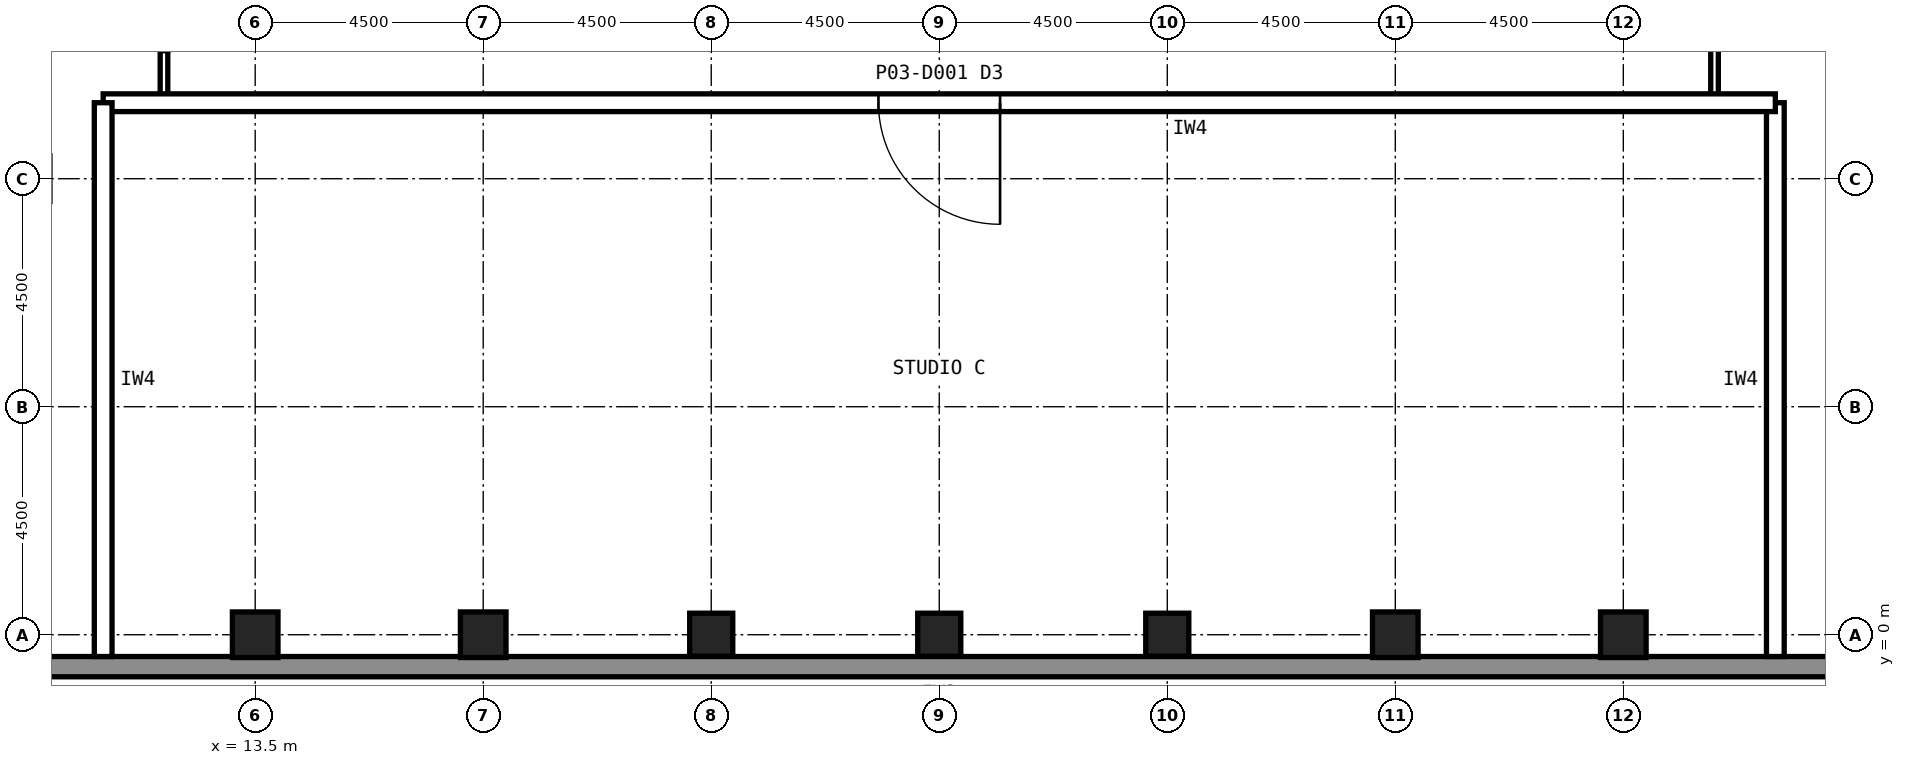
"""IFC4 building model, lengths in metres.
Left out: names, types, materials, properties, quantities, classifications, styles, units other than length and angle.
Written with IfcOpenShell. Run it as: python <this file> out.ifc"""

import sys

from ifc_helpers import new_model, si_unit, direction, frame, frame_2d, origin, origin_2d, place, context, subcontext, project, spatial, rectangle, hollow_rectangle, extrude, element, fill, save


model = new_model("IFC4")
c1 = context("Model", 3, precision=1e-05, world=origin(), true_north=direction((0.0, 1.0)))
c2 = subcontext(c1, "Body", "Model", "MODEL_VIEW")
j1 = project(units=[si_unit("LENGTHUNIT", "METRE"), si_unit("PLANEANGLEUNIT", "RADIAN")], contexts=[c1])
p1 = place(None, origin())
s1 = spatial("IfcSite", under=j1, at=p1, CompositionType="ELEMENT")
p2 = place(p1, origin())
s2 = spatial("IfcBuilding", under=s1, at=p2, CompositionType="ELEMENT")
p3 = place(p2, frame((0.0, 0.0, 12.0)))
s3 = spatial("IfcBuildingStorey", under=s2, at=p3, CompositionType="ELEMENT", Elevation=12.0)
for number, where, z_axis, x_axis in (
    (1, (13.5, 0.0, 0.0), (0.0, 0.0, 1.0), (1.0, 0.0, 0.0)),
    (2, (18.0, 0.0, 0.0), (0.0, 0.0, 1.0), (1.0, 0.0, 0.0)),
):
    element("IfcColumn", number, at=place(p3, frame(where, z_axis=z_axis, x_axis=x_axis)), inside=s3, PredefinedType="COLUMN", context=c2, shape_type="SweptSolid", body=[
        extrude(hollow_rectangle(XDim=0.9, YDim=0.9, WallThickness=0.063, at=origin_2d()), origin(), (0.0, 0.0, 1.0), 6.0),
    ])
for number, where, z_axis, x_axis in (
    (3, (22.5, 0.0, 0.0), (0.0, 0.0, 1.0), (1.0, 0.0, 0.0)),
    (4, (27.0, 0.0, 0.0), (0.0, 0.0, 1.0), (1.0, 0.0, 0.0)),
    (5, (31.5, 0.0, 0.0), (0.0, 0.0, 1.0), (1.0, 0.0, 0.0)),
):
    element("IfcColumn", number, at=place(p3, frame(where, z_axis=z_axis, x_axis=x_axis)), inside=s3, PredefinedType="COLUMN", context=c2, shape_type="SweptSolid", body=[
        extrude(hollow_rectangle(XDim=0.85, YDim=0.85, WallThickness=0.05, at=origin_2d()), origin(), (0.0, 0.0, 1.0), 6.0),
    ])
for number, where, z_axis, x_axis in (
    (6, (36.0, 0.0, 0.0), (0.0, 0.0, 1.0), (1.0, 0.0, 0.0)),
    (7, (40.5, 0.0, 0.0), (0.0, 0.0, 1.0), (1.0, 0.0, 0.0)),
):
    element("IfcColumn", number, at=place(p3, frame(where, z_axis=z_axis, x_axis=x_axis)), inside=s3, PredefinedType="COLUMN", context=c2, shape_type="SweptSolid", body=[
        extrude(hollow_rectangle(XDim=0.9, YDim=0.9, WallThickness=0.063, at=origin_2d()), origin(), (0.0, 0.0, 1.0), 6.0),
    ])
p4 = place(p3, frame((58.761, -0.63, 0.0), z_axis=(0.0, 0.0, 1.0), x_axis=(-1.0, 0.0, 0.0)))
e8 = element("IfcWall", 8, at=p4, inside=s3, PredefinedType="SOLIDWALL", context=c2, shape_type="SweptSolid", body=[
    extrude(rectangle(XDim=63.522, YDim=0.4, at=frame_2d((31.761, 0.0))), origin(), (0.0, 0.0, 1.0), 6.0),
])
p5 = place(p3, frame((42.3, 10.5, 0.0), z_axis=(0.0, 0.0, 1.0), x_axis=(0.0, 1.0, 0.0)))
e9 = element("IfcWall", 9, at=p5, inside=s3, PredefinedType="PARTITIONING", context=c2, shape_type="SweptSolid", body=[
    extrude(rectangle(XDim=7.5, YDim=0.15, at=frame_2d((3.75, 0.0))), origin(), (0.0, 0.0, 1.0), 5.8),
])
p6 = place(p5, frame((3.25, 0.0, 0.0)))
e10 = element("IfcOpeningElement", 10, at=p6, cuts=e9, PredefinedType="OPENING", context=c2, shape_type="SweptSolid", body=[
    extrude(rectangle(XDim=1.0, YDim=2.1, at=frame_2d((0.5, 1.05))), frame((0.0, 0.085, 0.0), z_axis=(0.0, -1.0, 0.0), x_axis=(1.0, 0.0, 0.0)), (0.0, 0.0, 1.0), 0.17),
])
p7 = place(p3, frame((11.7, 13.5, 0.0), z_axis=(0.0, 0.0, 1.0), x_axis=(0.0, -1.0, 0.0)))
e11 = element("IfcWall", 11, at=p7, inside=s3, PredefinedType="PARTITIONING", context=c2, shape_type="SweptSolid", body=[
    extrude(rectangle(XDim=3.0, YDim=0.15, at=frame_2d((1.5, 0.0))), origin(), (0.0, 0.0, 1.0), 5.8),
])
p8 = place(p7, frame((1.0, 0.0, 0.0)))
e12 = element("IfcOpeningElement", 12, at=p8, cuts=e11, PredefinedType="OPENING", context=c2, shape_type="SweptSolid", body=[
    extrude(rectangle(XDim=1.0, YDim=2.1, at=frame_2d((0.5, 1.05))), frame((0.0, 0.085, 0.0), z_axis=(0.0, -1.0, 0.0), x_axis=(1.0, 0.0, 0.0)), (0.0, 0.0, 1.0), 0.17),
])
p9 = place(p3, frame((43.5, -0.43, 0.0), z_axis=(0.0, 0.0, 1.0), x_axis=(0.0, 1.0, 0.0)))
e13 = element("IfcWall", 13, at=p9, inside=s3, PredefinedType="PARTITIONING", context=c2, shape_type="SweptSolid", body=[
    extrude(rectangle(XDim=10.93, YDim=0.35, at=frame_2d((5.465, 0.0))), origin(), (0.0, 0.0, 1.0), 5.8),
])
p10 = place(p3, frame((43.5, 10.5, 0.0), z_axis=(0.0, 0.0, 1.0), x_axis=(-1.0, 0.0, 0.0)))
e14 = element("IfcWall", 14, at=p10, inside=s3, PredefinedType="PARTITIONING", context=c2, shape_type="SweptSolid", body=[
    extrude(rectangle(XDim=33.0, YDim=0.35, at=frame_2d((16.5, 0.0))), origin(), (0.0, 0.0, 1.0), 5.8),
])
p11 = place(p10, frame((15.3, 0.0, 0.0)))
e15 = element("IfcOpeningElement", 15, at=p11, cuts=e14, PredefinedType="OPENING", context=c2, shape_type="SweptSolid", body=[
    extrude(rectangle(XDim=2.4, YDim=3.0, at=frame_2d((1.2, 1.5))), frame((0.0, 0.185, 0.0), z_axis=(0.0, -1.0, 0.0), x_axis=(1.0, 0.0, 0.0)), (0.0, 0.0, 1.0), 0.37),
])
p12 = place(p3, frame((10.5, 10.5, 0.0), z_axis=(0.0, 0.0, 1.0), x_axis=(0.0, -1.0, 0.0)))
e16 = element("IfcWall", 16, at=p12, inside=s3, PredefinedType="PARTITIONING", context=c2, shape_type="SweptSolid", body=[
    extrude(rectangle(XDim=10.93, YDim=0.35, at=frame_2d((5.465, 0.0))), origin(), (0.0, 0.0, 1.0), 5.8),
])
p13 = place(p11, origin())
e17 = element("IfcDoor", 17, at=p13, inside=s3, OperationType="SINGLE_SWING_LEFT", PredefinedType="DOOR", context=c2, shape_type="SweptSolid", body=[
    extrude(rectangle(XDim=2.4, YDim=3.0, at=frame_2d((1.2, 1.5))), frame((0.0, 0.025, 0.0), z_axis=(0.0, -1.0, 0.0), x_axis=(1.0, 0.0, 0.0)), (0.0, 0.0, 1.0), 0.05),
])
fill(e15, e17)
save(model, sys.argv[1])
